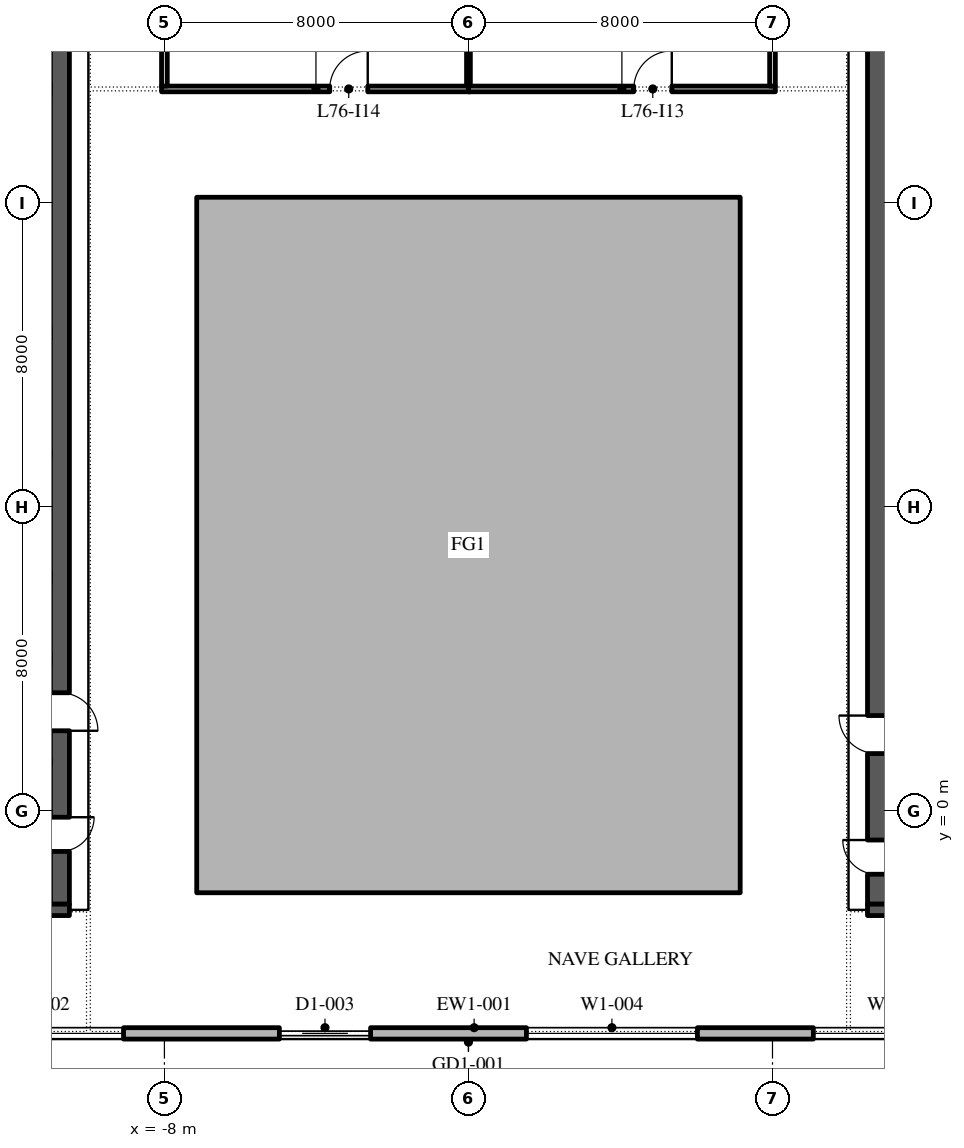
"""IFC4 building model, lengths in metres.
Left out: names, types, materials, properties, quantities, classifications, styles, units other than length and angle.
Written with IfcOpenShell. Run it as: python <this file> out.ifc"""

import sys

from ifc_helpers import new_model, si_unit, direction, frame, frame_2d, origin, place, context, subcontext, project, spatial, polyline, rectangle, outline, extrude, element, fill, save


model = new_model("IFC4")
c1 = context("Model", 3, precision=1e-05, world=origin(), true_north=direction((0.0, 1.0)))
c2 = subcontext(c1, "Body", "Model", "MODEL_VIEW")
j1 = project(units=[si_unit("LENGTHUNIT", "METRE"), si_unit("PLANEANGLEUNIT", "RADIAN")], contexts=[c1])
p1 = place(None, origin())
s1 = spatial("IfcSite", under=j1, at=p1, CompositionType="ELEMENT")
p2 = place(p1, origin())
s2 = spatial("IfcBuilding", under=s1, at=p2, CompositionType="ELEMENT")
p3 = place(p2, frame((0.0, 0.0, 346.8)))
s3 = spatial("IfcBuildingStorey", under=s2, at=p3, CompositionType="ELEMENT", Elevation=346.8)
p4 = place(p3, origin())
e1 = element("IfcWall", 1, at=p4, inside=s3, PredefinedType="STANDARD", context=c2, shape_type="SweptSolid", body=[
    extrude(outline(polyline([(-7.15, -2.15), (7.15, -2.15), (7.15, 16.15), (-7.15, 16.15), (-7.15, -2.15)]), holes=[polyline([(-7.0, -2.0), (-7.0, 16.0), (7.0, 16.0), (7.0, -2.0), (-7.0, -2.0)])]), origin(), (0.0, 0.0, 1.0), 4.0),
])
p5 = place(p3, frame((-22.35, -5.85, 0.0), z_axis=(0.0, 0.0, 1.0), x_axis=(1.0, 0.0, 0.0)))
e2 = element("IfcWall", 2, at=p5, inside=s3, PredefinedType="STANDARD", context=c2, shape_type="SweptSolid", body=[
    extrude(rectangle(XDim=45.0, YDim=0.3, at=frame_2d((22.5, 0.0))), origin(), (0.0, 0.0, 1.0), 4.0),
])
p6 = place(p5, frame((1.375, 0.0, 0.45)))
e3 = element("IfcOpeningElement", 3, at=p6, cuts=e2, PredefinedType="OPENING", context=c2, shape_type="SweptSolid", body=[
    extrude(rectangle(XDim=4.5, YDim=3.05, at=frame_2d((2.25, 1.525))), frame((0.0, 0.16, 0.0), z_axis=(0.0, -1.0, 0.0), x_axis=(1.0, 0.0, 0.0)), (0.0, 0.0, 1.0), 0.32),
])
p7 = place(p5, frame((8.775, 0.0, 0.45)))
e4 = element("IfcOpeningElement", 4, at=p7, cuts=e2, PredefinedType="OPENING", context=c2, shape_type="SweptSolid", body=[
    extrude(rectangle(XDim=4.5, YDim=3.05, at=frame_2d((2.25, 1.525))), frame((0.0, 0.16, 0.0), z_axis=(0.0, -1.0, 0.0), x_axis=(1.0, 0.0, 0.0)), (0.0, 0.0, 1.0), 0.32),
])
p8 = place(p5, frame((17.375, 0.0, 0.0)))
e5 = element("IfcOpeningElement", 5, at=p8, cuts=e2, PredefinedType="OPENING", context=c2, shape_type="SweptSolid", body=[
    extrude(rectangle(XDim=2.4, YDim=3.5, at=frame_2d((1.2, 1.75))), frame((0.0, 0.16, 0.0), z_axis=(0.0, -1.0, 0.0), x_axis=(1.0, 0.0, 0.0)), (0.0, 0.0, 1.0), 0.32),
])
p9 = place(p5, frame((23.875, 0.0, 0.45)))
e6 = element("IfcOpeningElement", 6, at=p9, cuts=e2, PredefinedType="OPENING", context=c2, shape_type="SweptSolid", body=[
    extrude(rectangle(XDim=4.5, YDim=3.05, at=frame_2d((2.25, 1.525))), frame((0.0, 0.16, 0.0), z_axis=(0.0, -1.0, 0.0), x_axis=(1.0, 0.0, 0.0)), (0.0, 0.0, 1.0), 0.32),
])
p10 = place(p5, frame((31.425, 0.0, 0.45)))
e7 = element("IfcOpeningElement", 7, at=p10, cuts=e2, PredefinedType="OPENING", context=c2, shape_type="SweptSolid", body=[
    extrude(rectangle(XDim=4.5, YDim=3.05, at=frame_2d((2.25, 1.525))), frame((0.0, 0.16, 0.0), z_axis=(0.0, -1.0, 0.0), x_axis=(1.0, 0.0, 0.0)), (0.0, 0.0, 1.0), 0.32),
])
p11 = place(p5, frame((38.975, 0.0, 0.45)))
e8 = element("IfcOpeningElement", 8, at=p11, cuts=e2, PredefinedType="OPENING", context=c2, shape_type="SweptSolid", body=[
    extrude(rectangle(XDim=4.5, YDim=3.05, at=frame_2d((2.25, 1.525))), frame((0.0, 0.16, 0.0), z_axis=(0.0, -1.0, 0.0), x_axis=(1.0, 0.0, 0.0)), (0.0, 0.0, 1.0), 0.32),
])
p12 = place(p3, frame((-10.75, -2.45, 0.0), z_axis=(0.0, 0.0, 1.0), x_axis=(0.0, 1.0, 0.0)))
e9 = element("IfcWall", 9, at=p12, inside=s3, PredefinedType="SHEAR", context=c2, shape_type="SweptSolid", body=[
    extrude(rectangle(XDim=27.9, YDim=0.5, at=frame_2d((13.95, 0.0))), origin(), (0.0, 0.0, 1.0), 4.0),
])
p13 = place(p12, frame((23.65, 0.0, 0.0)))
e10 = element("IfcOpeningElement", 10, at=p13, cuts=e9, PredefinedType="OPENING", context=c2, shape_type="SweptSolid", body=[
    extrude(rectangle(XDim=2.4, YDim=2.1, at=frame_2d((1.2, 1.05))), frame((0.0, 0.26, 0.0), z_axis=(0.0, -1.0, 0.0), x_axis=(1.0, 0.0, 0.0)), (0.0, 0.0, 1.0), 0.52),
])
p14 = place(p12, frame((1.387, 0.0, 0.0)))
e11 = element("IfcOpeningElement", 11, at=p14, cuts=e9, PredefinedType="OPENING", context=c2, shape_type="SweptSolid", body=[
    extrude(rectangle(XDim=0.9, YDim=2.1, at=frame_2d((0.45, 1.05))), frame((0.0, 0.26, 0.0), z_axis=(0.0, -1.0, 0.0), x_axis=(1.0, 0.0, 0.0)), (0.0, 0.0, 1.0), 0.52),
])
p15 = place(p12, frame((4.562, 0.0, 0.0)))
e12 = element("IfcOpeningElement", 12, at=p15, cuts=e9, PredefinedType="OPENING", context=c2, shape_type="SweptSolid", body=[
    extrude(rectangle(XDim=1.0, YDim=2.1, at=frame_2d((0.5, 1.05))), frame((0.0, 0.26, 0.0), z_axis=(0.0, -1.0, 0.0), x_axis=(1.0, 0.0, 0.0)), (0.0, 0.0, 1.0), 0.52),
])
p16 = place(p3, frame((-21.5, -2.6, 0.0), z_axis=(0.0, 0.0, 1.0), x_axis=(1.0, 0.0, 0.0)))
e13 = element("IfcWall", 13, at=p16, inside=s3, PredefinedType="SHEAR", context=c2, shape_type="SweptSolid", body=[
    extrude(rectangle(XDim=11.0, YDim=0.3, at=frame_2d((5.5, 0.0))), origin(), (0.0, 0.0, 1.0), 4.0),
])
p17 = place(p3, frame((10.75, -2.45, 0.0), z_axis=(0.0, 0.0, 1.0), x_axis=(0.0, 1.0, 0.0)))
e14 = element("IfcWall", 14, at=p17, inside=s3, PredefinedType="SHEAR", context=c2, shape_type="SweptSolid", body=[
    extrude(rectangle(XDim=27.9, YDim=0.5, at=frame_2d((13.95, 0.0))), origin(), (0.0, 0.0, 1.0), 4.0),
])
p18 = place(p17, frame((23.65, 0.0, 0.0)))
e15 = element("IfcOpeningElement", 15, at=p18, cuts=e14, PredefinedType="OPENING", context=c2, shape_type="SweptSolid", body=[
    extrude(rectangle(XDim=2.4, YDim=2.1, at=frame_2d((1.2, 1.05))), frame((0.0, 0.26, 0.0), z_axis=(0.0, -1.0, 0.0), x_axis=(1.0, 0.0, 0.0)), (0.0, 0.0, 1.0), 0.52),
])
p19 = place(p17, frame((0.788, 0.0, 0.0)))
e16 = element("IfcOpeningElement", 16, at=p19, cuts=e14, PredefinedType="OPENING", context=c2, shape_type="SweptSolid", body=[
    extrude(rectangle(XDim=0.9, YDim=2.1, at=frame_2d((0.45, 1.05))), frame((0.0, 0.26, 0.0), z_axis=(0.0, -1.0, 0.0), x_axis=(1.0, 0.0, 0.0)), (0.0, 0.0, 1.0), 0.52),
])
p20 = place(p17, frame((3.962, 0.0, 0.0)))
e17 = element("IfcOpeningElement", 17, at=p20, cuts=e14, PredefinedType="OPENING", context=c2, shape_type="SweptSolid", body=[
    extrude(rectangle(XDim=1.0, YDim=2.1, at=frame_2d((0.5, 1.05))), frame((0.0, 0.26, 0.0), z_axis=(0.0, -1.0, 0.0), x_axis=(1.0, 0.0, 0.0)), (0.0, 0.0, 1.0), 0.52),
])
p21 = place(p3, frame((10.5, -2.6, 0.0), z_axis=(0.0, 0.0, 1.0), x_axis=(1.0, 0.0, 0.0)))
e18 = element("IfcWall", 18, at=p21, inside=s3, PredefinedType="SHEAR", context=c2, shape_type="SweptSolid", body=[
    extrude(rectangle(XDim=11.0, YDim=0.3, at=frame_2d((5.5, 0.0))), origin(), (0.0, 0.0, 1.0), 4.0),
])
p22 = place(p3, frame((-8.075, 19.0, 0.0), z_axis=(0.0, 0.0, 1.0), x_axis=(1.0, 0.0, 0.0)))
e19 = element("IfcWall", 19, at=p22, inside=s3, PredefinedType="PARTITIONING", context=c2, shape_type="SweptSolid", body=[
    extrude(rectangle(XDim=8.125, YDim=0.15, at=frame_2d((4.062, 0.0))), origin(), (0.0, 0.0, 1.0), 4.0),
])
p23 = place(p22, frame((4.425, 0.0, 0.0)))
e20 = element("IfcOpeningElement", 20, at=p23, cuts=e19, PredefinedType="OPENING", context=c2, shape_type="SweptSolid", body=[
    extrude(rectangle(XDim=1.0, YDim=2.1, at=frame_2d((0.5, 1.05))), frame((0.0, 0.085, 0.0), z_axis=(0.0, -1.0, 0.0), x_axis=(1.0, 0.0, 0.0)), (0.0, 0.0, 1.0), 0.17),
])
p24 = place(p3, frame((-8.0, 26.45, 0.0), z_axis=(0.0, 0.0, 1.0), x_axis=(0.0, -1.0, 0.0)))
e21 = element("IfcWall", 21, at=p24, inside=s3, PredefinedType="PARTITIONING", context=c2, shape_type="SweptSolid", body=[
    extrude(rectangle(XDim=7.375, YDim=0.15, at=frame_2d((3.688, 0.0))), origin(), (0.0, 0.0, 1.0), 4.0),
])
p25 = place(p3, frame((0.0, 19.075, 0.0), z_axis=(0.0, 0.0, 1.0), x_axis=(0.0, 1.0, 0.0)))
e22 = element("IfcWall", 22, at=p25, inside=s3, PredefinedType="PARTITIONING", context=c2, shape_type="SweptSolid", body=[
    extrude(rectangle(XDim=7.475, YDim=0.1, at=frame_2d((3.738, 0.0))), origin(), (0.0, 0.0, 1.0), 4.0),
])
p26 = place(p3, frame((0.0, 19.0, 0.0), z_axis=(0.0, 0.0, 1.0), x_axis=(1.0, 0.0, 0.0)))
e23 = element("IfcWall", 23, at=p26, inside=s3, PredefinedType="PARTITIONING", context=c2, shape_type="SweptSolid", body=[
    extrude(rectangle(XDim=8.075, YDim=0.15, at=frame_2d((4.038, 0.0))), origin(), (0.0, 0.0, 1.0), 4.0),
])
p27 = place(p26, frame((4.35, 0.0, 0.0)))
e24 = element("IfcOpeningElement", 24, at=p27, cuts=e23, PredefinedType="OPENING", context=c2, shape_type="SweptSolid", body=[
    extrude(rectangle(XDim=1.0, YDim=2.1, at=frame_2d((0.5, 1.05))), frame((0.0, 0.085, 0.0), z_axis=(0.0, -1.0, 0.0), x_axis=(1.0, 0.0, 0.0)), (0.0, 0.0, 1.0), 0.17),
])
p28 = place(p3, frame((8.0, 19.075, 0.0), z_axis=(0.0, 0.0, 1.0), x_axis=(0.0, 1.0, 0.0)))
e25 = element("IfcWall", 25, at=p28, inside=s3, PredefinedType="PARTITIONING", context=c2, shape_type="SweptSolid", body=[
    extrude(rectangle(XDim=7.425, YDim=0.15, at=frame_2d((3.712, 0.0))), origin(), (0.0, 0.0, 1.0), 4.0),
])
p29 = place(p7, origin())
e26 = element("IfcWindow", 26, at=p29, inside=s3, PartitioningType="DOUBLE_PANEL_VERTICAL", PredefinedType="WINDOW", context=c2, shape_type="SweptSolid", body=[
    extrude(rectangle(XDim=4.5, YDim=3.05, at=frame_2d((2.25, 1.525))), frame((0.0, 0.03, 0.0), z_axis=(0.0, -1.0, 0.0), x_axis=(1.0, 0.0, 0.0)), (0.0, 0.0, 1.0), 0.06),
])
fill(e4, e26)
p30 = place(p8, origin())
e27 = element("IfcDoor", 27, at=p30, inside=s3, OperationType="DOUBLE_DOOR_SLIDING", PredefinedType="DOOR", context=c2, shape_type="SweptSolid", body=[
    extrude(rectangle(XDim=2.4, YDim=3.5, at=frame_2d((1.2, 1.75))), frame((0.0, 0.025, 0.0), z_axis=(0.0, -1.0, 0.0), x_axis=(1.0, 0.0, 0.0)), (0.0, 0.0, 1.0), 0.05),
])
fill(e5, e27)
p31 = place(p9, origin())
e28 = element("IfcWindow", 28, at=p31, inside=s3, PartitioningType="DOUBLE_PANEL_VERTICAL", PredefinedType="WINDOW", context=c2, shape_type="SweptSolid", body=[
    extrude(rectangle(XDim=4.5, YDim=3.05, at=frame_2d((2.25, 1.525))), frame((0.0, 0.03, 0.0), z_axis=(0.0, -1.0, 0.0), x_axis=(1.0, 0.0, 0.0)), (0.0, 0.0, 1.0), 0.06),
])
fill(e6, e28)
p32 = place(p10, origin())
e29 = element("IfcWindow", 29, at=p32, inside=s3, PartitioningType="DOUBLE_PANEL_VERTICAL", PredefinedType="WINDOW", context=c2, shape_type="SweptSolid", body=[
    extrude(rectangle(XDim=4.5, YDim=3.05, at=frame_2d((2.25, 1.525))), frame((0.0, 0.03, 0.0), z_axis=(0.0, -1.0, 0.0), x_axis=(1.0, 0.0, 0.0)), (0.0, 0.0, 1.0), 0.06),
])
fill(e7, e29)
p33 = place(p27, origin())
e30 = element("IfcDoor", 30, at=p33, inside=s3, OperationType="SINGLE_SWING_LEFT", PredefinedType="DOOR", context=c2, shape_type="SweptSolid", body=[
    extrude(rectangle(XDim=1.0, YDim=2.1, at=frame_2d((0.5, 1.05))), frame((0.0, 0.025, 0.0), z_axis=(0.0, -1.0, 0.0), x_axis=(1.0, 0.0, 0.0)), (0.0, 0.0, 1.0), 0.05),
])
fill(e24, e30)
p34 = place(p23, origin())
e31 = element("IfcDoor", 31, at=p34, inside=s3, OperationType="SINGLE_SWING_LEFT", PredefinedType="DOOR", context=c2, shape_type="SweptSolid", body=[
    extrude(rectangle(XDim=1.0, YDim=2.1, at=frame_2d((0.5, 1.05))), frame((0.0, 0.025, 0.0), z_axis=(0.0, -1.0, 0.0), x_axis=(1.0, 0.0, 0.0)), (0.0, 0.0, 1.0), 0.05),
])
fill(e20, e31)
save(model, sys.argv[1])
